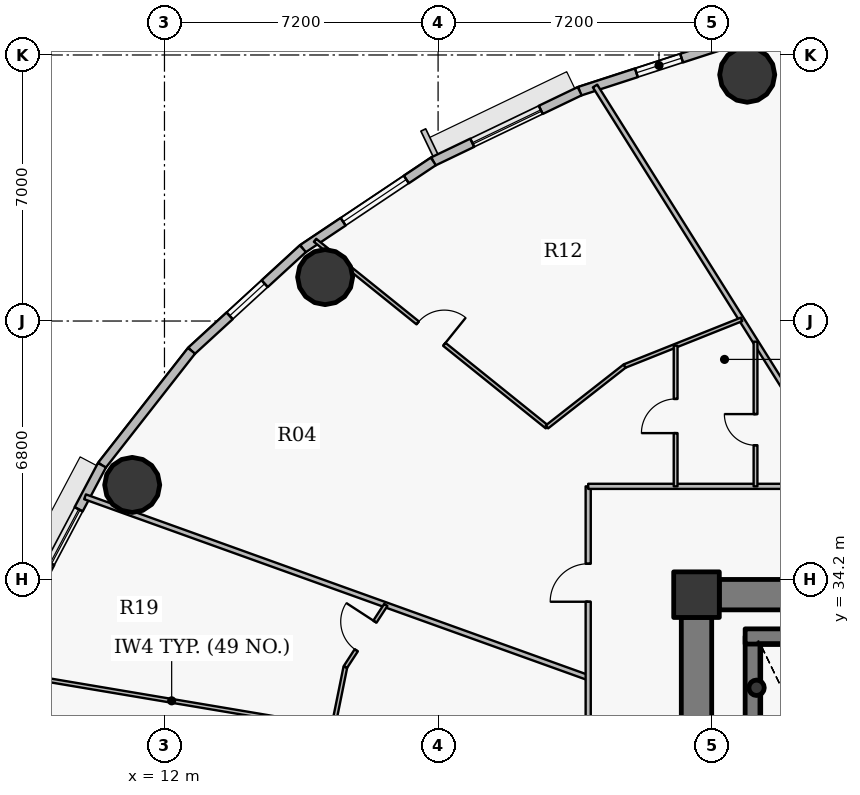
"""IFC4 building model, lengths in metres.
Left out: names, types, materials, properties, quantities, classifications, styles, units other than length and angle.
Written with IfcOpenShell. Run it as: python <this file> out.ifc"""

import sys

from ifc_helpers import new_model, si_unit, direction, frame, frame_2d, origin, origin_2d, place, context, subcontext, project, spatial, rectangle, hollow_circle, extrude, source, transform, mapped, element, fill, save


model = new_model("IFC4")
c1 = context("Model", 3, precision=1e-05, world=origin(), true_north=direction((0.0, 1.0)))
c2 = subcontext(c1, "Body", "Model", "MODEL_VIEW")
j1 = project(units=[si_unit("LENGTHUNIT", "METRE"), si_unit("PLANEANGLEUNIT", "RADIAN")], contexts=[c1])
p1 = place(None, origin())
s1 = spatial("IfcSite", under=j1, at=p1, CompositionType="ELEMENT")
p2 = place(p1, origin())
s2 = spatial("IfcBuilding", under=s1, at=p2, CompositionType="ELEMENT")
p3 = place(p2, frame((0.0, 0.0, 123.45)))
s3 = spatial("IfcBuildingStorey", under=s2, at=p3, CompositionType="ELEMENT", Elevation=123.45)
p4 = place(p3, frame((26.0, 33.8, 0.0), z_axis=(0.0, 0.0, 1.0), x_axis=(1.0, 0.0, 0.0)))
e1 = element("IfcColumn", 1, at=p4, inside=s3, PredefinedType="COLUMN", context=c2, shape_type="SweptSolid", body=[
    extrude(rectangle(XDim=1.2, YDim=1.2, at=origin_2d()), origin(), (0.0, 0.0, 1.0), 3.75),
])
p5 = place(p3, frame((27.48, 24.1, 0.0), z_axis=(0.0, 0.0, 1.0), x_axis=(0.0, 1.0, 0.0)))
e2 = element("IfcWall", 2, at=p5, inside=s3, PredefinedType="SHEAR", context=c2, shape_type="SweptSolid", body=[
    extrude(rectangle(XDim=8.6, YDim=0.4, at=frame_2d((4.3, 0.0))), origin(), (0.0, 0.0, 1.0), 3.75),
])
p6 = place(p3, frame((27.28, 32.7, 0.0), z_axis=(0.0, 0.0, 1.0), x_axis=(1.0, 0.0, 0.0)))
e3 = element("IfcWall", 3, at=p6, inside=s3, PredefinedType="SHEAR", context=c2, shape_type="SweptSolid", body=[
    extrude(rectangle(XDim=4.1, YDim=0.4, at=frame_2d((2.05, 0.0))), origin(), (0.0, 0.0, 1.0), 3.75),
])
p7 = place(p3, frame((27.58, 31.35, 0.0), z_axis=(0.0, 0.0, 1.0), x_axis=(1.0, 0.0, 0.0)))
e4 = element("IfcColumn", 4, at=p7, inside=s3, PredefinedType="COLUMN", context=c2, shape_type="SweptSolid", body=[
    extrude(hollow_circle(Radius=0.203, WallThickness=0.016, at=origin_2d()), origin(), (0.0, 0.0, 1.0), 3.75),
])
p8 = place(p3, frame((26.6, 33.8, 0.0), z_axis=(0.0, 0.0, 1.0), x_axis=(1.0, 0.0, 0.0)))
e5 = element("IfcWall", 5, at=p8, inside=s3, PredefinedType="SHEAR", context=c2, shape_type="SweptSolid", body=[
    extrude(rectangle(XDim=18.8, YDim=0.8, at=frame_2d((9.4, 0.0))), origin(), (0.0, 0.0, 1.0), 2.95),
])
p9 = place(p3, frame((26.0, 20.8, 0.0), z_axis=(0.0, 0.0, 1.0), x_axis=(0.0, 1.0, 0.0)))
e6 = element("IfcWall", 6, at=p9, inside=s3, PredefinedType="SHEAR", context=c2, shape_type="SweptSolid", body=[
    extrude(rectangle(XDim=12.4, YDim=0.8, at=frame_2d((6.2, 0.0))), origin(), (0.0, 0.0, 1.0), 2.95),
])
p10 = place(p9, frame((5.79, 0.0, 0.0)))
e7 = element("IfcOpeningElement", 7, at=p10, cuts=e6, PredefinedType="OPENING", context=c2, shape_type="SweptSolid", body=[
    extrude(rectangle(XDim=0.82, YDim=2.1, at=origin_2d()), frame((0.41, 0.41, 1.05), z_axis=(0.0, -1.0, 0.0), x_axis=(1.0, 0.0, 0.0)), (0.0, 0.0, 1.0), 0.82),
])
for number, where, z_axis, x_axis in (
    (8, (27.334, 47.481, 0.0), (0.0, 0.0, 1.0), (1.0, 0.0, 0.0)),
    (9, (16.227, 42.156, 0.0), (0.0, 0.0, 1.0), (1.0, 0.0, 0.0)),
    (10, (11.151, 36.688, 0.0), (0.0, 0.0, 1.0), (1.0, 0.0, 0.0)),
):
    element("IfcColumn", number, at=place(p3, frame(where, z_axis=z_axis, x_axis=x_axis)), inside=s3, PredefinedType="COLUMN", context=c2, shape_type="SweptSolid", body=[
        extrude(hollow_circle(Radius=0.725, WallThickness=0.042, at=origin_2d()), origin(), (0.0, 0.0, 1.0), 3.75),
    ])
p11 = place(p3, frame((22.926, 47.047, 0.0), z_axis=(0.0, 0.0, 1.0), x_axis=(0.951211346073, 0.308540070495, 0.0)))
e11 = element("IfcWall", 11, at=p11, inside=s3, PredefinedType="SOLIDWALL", context=c2, shape_type="SweptSolid", body=[
    extrude(rectangle(XDim=4.388, YDim=0.24, at=frame_2d((2.194, 0.0))), origin(), (0.0, 0.0, 1.0), 3.5),
])
p12 = place(p11, frame((1.569, 0.0, 0.9)))
e12 = element("IfcOpeningElement", 12, at=p12, cuts=e11, PredefinedType="OPENING", context=c2, shape_type="SweptSolid", body=[
    extrude(rectangle(XDim=1.25, YDim=1.65, at=origin_2d()), frame((0.625, 0.13, 0.825), z_axis=(0.0, -1.0, 0.0), x_axis=(1.0, 0.0, 0.0)), (0.0, 0.0, 1.0), 0.26),
])
p13 = place(p3, frame((19.075, 45.199, 0.0), z_axis=(0.0, 0.0, 1.0), x_axis=(0.901589935876, 0.432591709962, 0.0)))
e13 = element("IfcWall", 13, at=p13, inside=s3, PredefinedType="SOLIDWALL", context=c2, shape_type="SweptSolid", body=[
    extrude(rectangle(XDim=4.272, YDim=0.24, at=frame_2d((2.136, 0.0))), origin(), (0.0, 0.0, 1.0), 3.5),
])
p14 = place(p13, frame((1.136, 0.0, 0.9)))
e14 = element("IfcOpeningElement", 14, at=p14, cuts=e13, PredefinedType="OPENING", context=c2, shape_type="SweptSolid", body=[
    extrude(rectangle(XDim=2.0, YDim=1.75, at=origin_2d()), frame((1.0, 0.13, 0.875), z_axis=(0.0, -1.0, 0.0), x_axis=(1.0, 0.0, 0.0)), (0.0, 0.0, 1.0), 0.26),
])
p15 = place(p3, frame((15.642, 42.903, 0.0), z_axis=(0.0, 0.0, 1.0), x_axis=(0.831221811447, 0.555940914284, 0.0)))
e15 = element("IfcWall", 15, at=p15, inside=s3, PredefinedType="SOLIDWALL", context=c2, shape_type="SweptSolid", body=[
    extrude(rectangle(XDim=4.13, YDim=0.24, at=frame_2d((2.065, 0.0))), origin(), (0.0, 0.0, 1.0), 3.5),
])
p16 = place(p15, frame((1.276, 0.0, 0.9)))
e16 = element("IfcOpeningElement", 16, at=p16, cuts=e15, PredefinedType="OPENING", context=c2, shape_type="SweptSolid", body=[
    extrude(rectangle(XDim=2.0, YDim=1.75, at=origin_2d()), frame((1.0, 0.13, 0.875), z_axis=(0.0, -1.0, 0.0), x_axis=(1.0, 0.0, 0.0)), (0.0, 0.0, 1.0), 0.26),
])
p17 = place(p3, frame((12.711, 40.217, 0.0), z_axis=(0.0, 0.0, 1.0), x_axis=(0.737113356241, 0.675769117414, 0.0)))
e17 = element("IfcWall", 17, at=p17, inside=s3, PredefinedType="SOLIDWALL", context=c2, shape_type="SweptSolid", body=[
    extrude(rectangle(XDim=3.976, YDim=0.24, at=frame_2d((1.988, 0.0))), origin(), (0.0, 0.0, 1.0), 3.5),
])
p18 = place(p17, frame((1.363, 0.0, 0.9)))
e18 = element("IfcOpeningElement", 18, at=p18, cuts=e17, PredefinedType="OPENING", context=c2, shape_type="SweptSolid", body=[
    extrude(rectangle(XDim=1.25, YDim=1.65, at=origin_2d()), frame((0.625, 0.13, 0.825), z_axis=(0.0, -1.0, 0.0), x_axis=(1.0, 0.0, 0.0)), (0.0, 0.0, 1.0), 0.26),
])
p19 = place(p3, frame((10.355, 37.206, 0.0), z_axis=(0.0, 0.0, 1.0), x_axis=(0.616272103517, 0.787533297345, 0.0)))
e19 = element("IfcWall", 19, at=p19, inside=s3, PredefinedType="SOLIDWALL", context=c2, shape_type="SweptSolid", body=[
    extrude(rectangle(XDim=3.823, YDim=0.24, at=frame_2d((1.912, 0.0))), origin(), (0.0, 0.0, 1.0), 3.5),
])
p20 = place(p3, frame((8.63, 33.945, 0.0), z_axis=(0.0, 0.0, 1.0), x_axis=(0.467614004126, 0.883932770716, 0.0)))
e20 = element("IfcWall", 20, at=p20, inside=s3, PredefinedType="SOLIDWALL", context=c2, shape_type="SweptSolid", body=[
    extrude(rectangle(XDim=3.689, YDim=0.24, at=frame_2d((1.844, 0.0))), origin(), (0.0, 0.0, 1.0), 3.5),
])
p21 = place(p20, frame((0.778, 0.0, 0.9)))
e21 = element("IfcOpeningElement", 21, at=p21, cuts=e20, PredefinedType="OPENING", context=c2, shape_type="SweptSolid", body=[
    extrude(rectangle(XDim=1.6, YDim=1.75, at=origin_2d()), frame((0.8, 0.13, 0.875), z_axis=(0.0, -1.0, 0.0), x_axis=(1.0, 0.0, 0.0)), (0.0, 0.0, 1.0), 0.26),
])
p22 = place(p3, frame((7.943, 31.721, 0.0), z_axis=(0.0, 0.0, 1.0), x_axis=(0.986139151265, -0.165920385556, 0.0)))
e22 = element("IfcWall", 22, at=p22, inside=s3, PredefinedType="PARTITIONING", context=c2, shape_type="SweptSolid", body=[
    extrude(rectangle(XDim=8.612, YDim=0.1, at=frame_2d((4.306, 0.0))), origin(), (0.0, 0.0, 1.0), 2.935),
])
p23 = place(p3, frame((9.91, 36.375, 0.0), z_axis=(0.0, 0.0, 1.0), x_axis=(0.941089213164, -0.338158384292, 0.0)))
e23 = element("IfcWall", 23, at=p23, inside=s3, PredefinedType="PARTITIONING", context=c2, shape_type="SweptSolid", body=[
    extrude(rectangle(XDim=14.069, YDim=0.135, at=frame_2d((7.035, 0.0))), origin(), (0.0, 0.0, 1.0), 2.935),
])
p24 = place(p3, frame((15.945, 27.865, 0.0), z_axis=(0.0, 0.0, 1.0), x_axis=(0.198216891741, 0.980158183065, 0.0)))
e24 = element("IfcWall", 24, at=p24, inside=s3, PredefinedType="PARTITIONING", context=c2, shape_type="SweptSolid", body=[
    extrude(rectangle(XDim=4.111, YDim=0.1, at=frame_2d((2.056, 0.0))), origin(), (0.0, 0.0, 1.0), 3.5),
])
p25 = place(p3, frame((15.963, 43.124, 0.0), z_axis=(0.0, 0.0, 1.0), x_axis=(0.779083359145, -0.626920345421, 0.0)))
e25 = element("IfcWall", 25, at=p25, inside=s3, PredefinedType="PARTITIONING", context=c2, shape_type="SweptSolid", body=[
    extrude(rectangle(XDim=7.831, YDim=0.1, at=frame_2d((3.916, 0.0))), origin(), (0.0, 0.0, 1.0), 2.935),
])
p26 = place(p25, frame((3.466, 0.0, 0.0)))
e26 = element("IfcOpeningElement", 26, at=p26, cuts=e25, PredefinedType="OPENING", context=c2, shape_type="SweptSolid", body=[
    extrude(rectangle(XDim=0.9, YDim=2.1, at=origin_2d()), frame((0.45, 0.06, 1.05), z_axis=(0.0, -1.0, 0.0), x_axis=(1.0, 0.0, 0.0)), (0.0, 0.0, 1.0), 0.12),
])
p27 = place(p3, frame((16.76, 31.895, 0.0), z_axis=(0.0, 0.0, 1.0), x_axis=(0.545370803514, 0.838194897786, 0.0)))
e27 = element("IfcWall", 27, at=p27, inside=s3, PredefinedType="PARTITIONING", context=c2, shape_type="SweptSolid", body=[
    extrude(rectangle(XDim=1.952, YDim=0.1, at=frame_2d((0.976, 0.0))), origin(), (0.0, 0.0, 1.0), 3.5),
])
p28 = place(p27, frame((0.526, 0.0, 0.0)))
e28 = element("IfcOpeningElement", 28, at=p28, cuts=e27, PredefinedType="OPENING", context=c2, shape_type="SweptSolid", body=[
    extrude(rectangle(XDim=0.9, YDim=2.1, at=origin_2d()), frame((0.45, 0.06, 1.05), z_axis=(0.0, -1.0, 0.0), x_axis=(1.0, 0.0, 0.0)), (0.0, 0.0, 1.0), 0.12),
])
p29 = place(p3, frame((22.064, 38.214, 0.0), z_axis=(0.0, 0.0, 1.0), x_axis=(0.787364158956, 0.616488184146, 0.0)))
e29 = element("IfcWall", 29, at=p29, inside=s3, PredefinedType="PARTITIONING", context=c2, shape_type="SweptSolid", body=[
    extrude(rectangle(XDim=2.597, YDim=0.1, at=frame_2d((1.299, 0.0))), origin(), (0.0, 0.0, 1.0), 3.5),
])
p30 = place(p3, frame((23.15, 17.35, 0.0), z_axis=(0.0, 0.0, 1.0), x_axis=(0.0, 1.0, 0.0)))
e30 = element("IfcWall", 30, at=p30, inside=s3, PredefinedType="PARTITIONING", context=c2, shape_type="SweptSolid", body=[
    extrude(rectangle(XDim=19.3, YDim=0.135, at=frame_2d((9.65, 0.0))), origin(), (0.0, 0.0, 1.0), 2.935),
])
p31 = place(p30, frame((16.264, 0.0, 0.0)))
e31 = element("IfcOpeningElement", 31, at=p31, cuts=e30, PredefinedType="OPENING", context=c2, shape_type="SweptSolid", body=[
    extrude(rectangle(XDim=1.0, YDim=2.15, at=origin_2d()), frame((0.5, 0.078, 1.075), z_axis=(0.0, -1.0, 0.0), x_axis=(1.0, 0.0, 0.0)), (0.0, 0.0, 1.0), 0.155),
])
p32 = place(p30, frame((7.426, 0.0, 0.0)))
e32 = element("IfcOpeningElement", 32, at=p32, cuts=e30, PredefinedType="OPENING", context=c2, shape_type="SweptSolid", body=[
    extrude(rectangle(XDim=1.0, YDim=2.15, at=origin_2d()), frame((0.5, 0.078, 1.075), z_axis=(0.0, -1.0, 0.0), x_axis=(1.0, 0.0, 0.0)), (0.0, 0.0, 1.0), 0.155),
])
p33 = place(p3, frame((23.15, 36.65, 0.0), z_axis=(0.0, 0.0, 1.0), x_axis=(1.0, 0.0, 0.0)))
e33 = element("IfcWall", 33, at=p33, inside=s3, PredefinedType="PARTITIONING", context=c2, shape_type="SweptSolid", body=[
    extrude(rectangle(XDim=10.612, YDim=0.135, at=frame_2d((5.306, 0.0))), origin(), (0.0, 0.0, 1.0), 2.935),
])
p34 = place(p33, frame((8.182, 0.0, 0.0)))
e34 = element("IfcOpeningElement", 34, at=p34, cuts=e33, PredefinedType="OPENING", context=c2, shape_type="SweptSolid", body=[
    extrude(rectangle(XDim=1.0, YDim=2.15, at=origin_2d()), frame((0.5, 0.078, 1.075), z_axis=(0.0, -1.0, 0.0), x_axis=(1.0, 0.0, 0.0)), (0.0, 0.0, 1.0), 0.155),
])
p35 = place(p3, frame((23.33, 47.184, 0.0), z_axis=(0.0, 0.0, 1.0), x_axis=(0.531660079213, -0.846957826678, 0.0)))
e35 = element("IfcWall", 35, at=p35, inside=s3, PredefinedType="PARTITIONING", context=c2, shape_type="SweptSolid", body=[
    extrude(rectangle(XDim=12.437, YDim=0.135, at=frame_2d((6.219, 0.0))), origin(), (0.0, 0.0, 1.0), 2.935),
])
p36 = place(p3, frame((24.109, 39.816, 0.0), z_axis=(0.0, 0.0, 1.0), x_axis=(0.928811896505, 0.370551563092, 0.0)))
e36 = element("IfcWall", 36, at=p36, inside=s3, PredefinedType="PARTITIONING", context=c2, shape_type="SweptSolid", body=[
    extrude(rectangle(XDim=3.312, YDim=0.1, at=frame_2d((1.656, 0.0))), origin(), (0.0, 0.0, 1.0), 3.5),
])
p37 = place(p3, frame((25.451, 36.65, 0.0), z_axis=(0.0, 0.0, 1.0), x_axis=(0.0, 1.0, 0.0)))
e37 = element("IfcWall", 37, at=p37, inside=s3, PredefinedType="PARTITIONING", context=c2, shape_type="SweptSolid", body=[
    extrude(rectangle(XDim=3.701, YDim=0.1, at=frame_2d((1.851, 0.0))), origin(), (0.0, 0.0, 1.0), 3.5),
])
p38 = place(p37, frame((1.4, 0.0, 0.0)))
e38 = element("IfcOpeningElement", 38, at=p38, cuts=e37, PredefinedType="OPENING", context=c2, shape_type="SweptSolid", body=[
    extrude(rectangle(XDim=0.9, YDim=2.1, at=origin_2d()), frame((0.45, 0.06, 1.05), z_axis=(0.0, -1.0, 0.0), x_axis=(1.0, 0.0, 0.0)), (0.0, 0.0, 1.0), 0.12),
])
p39 = place(p3, frame((27.553, 36.65, 0.0), z_axis=(0.0, 0.0, 1.0), x_axis=(0.0, 1.0, 0.0)))
e39 = element("IfcWall", 39, at=p39, inside=s3, PredefinedType="PARTITIONING", context=c2, shape_type="SweptSolid", body=[
    extrude(rectangle(XDim=3.806, YDim=0.1, at=frame_2d((1.903, 0.0))), origin(), (0.0, 0.0, 1.0), 3.5),
])
p40 = place(p39, frame((1.081, 0.0, 0.0)))
e40 = element("IfcOpeningElement", 40, at=p40, cuts=e39, PredefinedType="OPENING", context=c2, shape_type="SweptSolid", body=[
    extrude(rectangle(XDim=0.82, YDim=2.1, at=origin_2d()), frame((0.41, 0.06, 1.05), z_axis=(0.0, -1.0, 0.0), x_axis=(1.0, 0.0, 0.0)), (0.0, 0.0, 1.0), 0.12),
])
p41 = place(p3, frame((26.59, 34.2, 0.0), z_axis=(0.0, 0.0, 1.0), x_axis=(-1.0, 0.0, 0.0)))
e41 = element("IfcWall", 41, at=p41, inside=s3, PredefinedType="PARTITIONING", context=c2, shape_type="SweptSolid", body=[
    extrude(rectangle(XDim=0.99, YDim=0.135, at=frame_2d((0.495, 0.0))), origin(), (0.0, 0.0, 1.0), 2.935),
])
p42 = place(p3, frame((25.6, 33.893, 0.0), z_axis=(0.0, 0.0, 1.0), x_axis=(0.0, -1.0, 0.0)))
e42 = element("IfcWall", 42, at=p42, inside=s3, PredefinedType="PARTITIONING", context=c2, shape_type="SweptSolid", body=[
    extrude(rectangle(XDim=0.683, YDim=0.135, at=frame_2d((0.341, 0.0))), origin(), (0.0, 0.0, 1.0), 3.5),
])
m1 = source(origin(), c2, "Body", "SweptSolid", [
    extrude(rectangle(XDim=2.0, YDim=1.75, at=origin_2d()), frame((1.0, 0.03, 0.875), z_axis=(0.0, -1.0, 0.0), x_axis=(1.0, 0.0, 0.0)), (0.0, 0.0, 1.0), 0.06),
])
p43 = place(p14, origin())
e43 = element("IfcWindow", 43, at=p43, inside=s3, PartitioningType="DOUBLE_PANEL_VERTICAL", PredefinedType="WINDOW", context=c2, shape_type="MappedRepresentation", body=[
    mapped(m1, transform((0.0, 0.0, 0.0), x_axis=(1.0, 0.0, 0.0), y_axis=(0.0, 1.0, 0.0), z_axis=(0.0, 0.0, 1.0), scale=1.0)),
])
fill(e14, e43)
p44 = place(p16, origin())
e44 = element("IfcWindow", 44, at=p44, inside=s3, PartitioningType="DOUBLE_PANEL_VERTICAL", PredefinedType="WINDOW", context=c2, shape_type="MappedRepresentation", body=[
    mapped(m1, transform((0.0, 0.0, 0.0), x_axis=(1.0, 0.0, 0.0), y_axis=(0.0, 1.0, 0.0), z_axis=(0.0, 0.0, 1.0), scale=1.0)),
])
fill(e16, e44)
m2 = source(origin(), c2, "Body", "SweptSolid", [
    extrude(rectangle(XDim=1.6, YDim=1.75, at=origin_2d()), frame((0.8, 0.03, 0.875), z_axis=(0.0, -1.0, 0.0), x_axis=(1.0, 0.0, 0.0)), (0.0, 0.0, 1.0), 0.06),
])
p45 = place(p21, origin())
e45 = element("IfcWindow", 45, at=p45, inside=s3, PartitioningType="DOUBLE_PANEL_VERTICAL", PredefinedType="WINDOW", context=c2, shape_type="MappedRepresentation", body=[
    mapped(m2, transform((0.0, 0.0, 0.0), x_axis=(1.0, 0.0, 0.0), y_axis=(0.0, 1.0, 0.0), z_axis=(0.0, 0.0, 1.0), scale=1.0)),
])
fill(e21, e45)
m3 = source(origin(), c2, "Body", "SweptSolid", [
    extrude(rectangle(XDim=1.25, YDim=1.65, at=origin_2d()), frame((0.625, 0.03, 0.825), z_axis=(0.0, -1.0, 0.0), x_axis=(1.0, 0.0, 0.0)), (0.0, 0.0, 1.0), 0.06),
])
p46 = place(p12, origin())
e46 = element("IfcWindow", 46, at=p46, inside=s3, PartitioningType="SINGLE_PANEL", PredefinedType="WINDOW", context=c2, shape_type="MappedRepresentation", body=[
    mapped(m3, transform((0.0, 0.0, 0.0), x_axis=(1.0, 0.0, 0.0), y_axis=(0.0, 1.0, 0.0), z_axis=(0.0, 0.0, 1.0), scale=1.0)),
])
fill(e12, e46)
p47 = place(p18, origin())
e47 = element("IfcWindow", 47, at=p47, inside=s3, PartitioningType="SINGLE_PANEL", PredefinedType="WINDOW", context=c2, shape_type="MappedRepresentation", body=[
    mapped(m3, transform((0.0, 0.0, 0.0), x_axis=(1.0, 0.0, 0.0), y_axis=(0.0, 1.0, 0.0), z_axis=(0.0, 0.0, 1.0), scale=1.0)),
])
fill(e18, e47)
m4 = source(origin(), c2, "Body", "SweptSolid", [
    extrude(rectangle(XDim=1.0, YDim=2.15, at=origin_2d()), frame((0.5, 0.025, 1.075), z_axis=(0.0, -1.0, 0.0), x_axis=(1.0, 0.0, 0.0)), (0.0, 0.0, 1.0), 0.05),
])
p48 = place(p31, origin())
e48 = element("IfcDoor", 48, at=p48, inside=s3, OperationType="SINGLE_SWING_LEFT", PredefinedType="DOOR", context=c2, shape_type="MappedRepresentation", body=[
    mapped(m4, transform((0.0, 0.0, 0.0), x_axis=(1.0, 0.0, 0.0), y_axis=(0.0, 1.0, 0.0), z_axis=(0.0, 0.0, 1.0), scale=1.0)),
])
fill(e31, e48)
m5 = source(origin(), c2, "Body", "SweptSolid", [
    extrude(rectangle(XDim=0.9, YDim=2.1, at=origin_2d()), frame((0.45, 0.025, 1.05), z_axis=(0.0, -1.0, 0.0), x_axis=(1.0, 0.0, 0.0)), (0.0, 0.0, 1.0), 0.05),
])
p49 = place(p26, origin())
e49 = element("IfcDoor", 49, at=p49, inside=s3, OperationType="SINGLE_SWING_RIGHT", PredefinedType="DOOR", context=c2, shape_type="MappedRepresentation", body=[
    mapped(m5, transform((0.0, 0.0, 0.0), x_axis=(1.0, 0.0, 0.0), y_axis=(0.0, 1.0, 0.0), z_axis=(0.0, 0.0, 1.0), scale=1.0)),
])
fill(e26, e49)
p50 = place(p38, origin())
e50 = element("IfcDoor", 50, at=p50, inside=s3, OperationType="SINGLE_SWING_LEFT", PredefinedType="DOOR", context=c2, shape_type="MappedRepresentation", body=[
    mapped(m5, transform((0.0, 0.0, 0.0), x_axis=(1.0, 0.0, 0.0), y_axis=(0.0, 1.0, 0.0), z_axis=(0.0, 0.0, 1.0), scale=1.0)),
])
fill(e38, e50)
m6 = source(origin(), c2, "Body", "SweptSolid", [
    extrude(rectangle(XDim=0.82, YDim=2.1, at=origin_2d()), frame((0.41, 0.025, 1.05), z_axis=(0.0, -1.0, 0.0), x_axis=(1.0, 0.0, 0.0)), (0.0, 0.0, 1.0), 0.05),
])
p51 = place(p40, origin())
e51 = element("IfcDoor", 51, at=p51, inside=s3, OperationType="SINGLE_SWING_RIGHT", PredefinedType="DOOR", context=c2, shape_type="MappedRepresentation", body=[
    mapped(m6, transform((0.0, 0.0, 0.0), x_axis=(1.0, 0.0, 0.0), y_axis=(0.0, 1.0, 0.0), z_axis=(0.0, 0.0, 1.0), scale=1.0)),
])
fill(e40, e51)
p52 = place(p28, origin())
e52 = element("IfcDoor", 52, at=p52, inside=s3, OperationType="SINGLE_SWING_RIGHT", PredefinedType="DOOR", context=c2, shape_type="MappedRepresentation", body=[
    mapped(m5, transform((0.0, 0.0, 0.0), x_axis=(1.0, 0.0, 0.0), y_axis=(0.0, 1.0, 0.0), z_axis=(0.0, 0.0, 1.0), scale=1.0)),
])
fill(e28, e52)
save(model, sys.argv[1])
